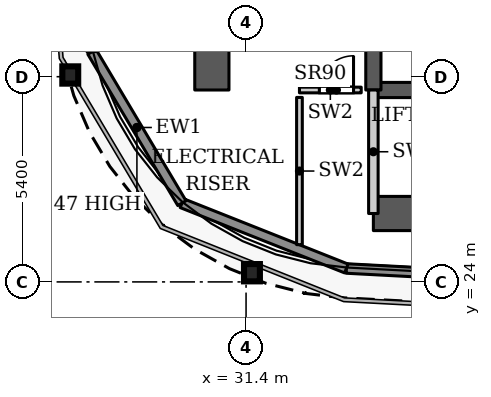
"""IFC4 building model, lengths in metres.
Left out: names, types, materials, properties, quantities, classifications, styles, units other than length and angle.
Written with IfcOpenShell. Run it as: python <this file> out.ifc"""

import sys

from ifc_helpers import new_model, si_unit, direction, frame, frame_2d, origin, origin_2d, place, context, subcontext, project, spatial, rectangle, i_section, extrude, source, transform, mapped, element, fill, save


model = new_model("IFC4")
c1 = context("Model", 3, precision=1e-05, world=origin(), true_north=direction((0.0, 1.0)))
c2 = subcontext(c1, "Body", "Model", "MODEL_VIEW")
j1 = project(units=[si_unit("LENGTHUNIT", "METRE"), si_unit("PLANEANGLEUNIT", "RADIAN")], contexts=[c1])
p1 = place(None, origin())
s1 = spatial("IfcSite", under=j1, at=p1, CompositionType="ELEMENT")
p2 = place(p1, origin())
s2 = spatial("IfcBuilding", under=s1, at=p2, CompositionType="ELEMENT")
p3 = place(p2, frame((0.0, 0.0, 98.0)))
s3 = spatial("IfcBuildingStorey", under=s2, at=p3, CompositionType="ELEMENT", Elevation=98.0)
for number, where, z_axis, x_axis in (
    (1, (31.555, 24.242, 0.0), (0.0, 0.0, 1.0), (1.0, 0.0, 0.0)),
    (2, (26.774, 29.445, 0.0), (0.0, 0.0, 1.0), (1.0, 0.0, 0.0)),
):
    element("IfcColumn", number, at=place(p3, frame(where, z_axis=z_axis, x_axis=x_axis)), inside=s3, PredefinedType="COLUMN", context=c2, shape_type="SweptSolid", body=[
        extrude(i_section(OverallWidth=0.418, OverallDepth=0.455, WebThickness=0.042, FlangeThickness=0.068, FilletRadius=0.014, at=origin_2d()), origin(), (0.0, 0.0, 1.0), 3.9),
    ])
p4 = place(p3, frame((34.75, 25.8, 0.0), z_axis=(0.0, 0.0, 1.0), x_axis=(1.0, 0.0, 0.0)))
e3 = element("IfcWall", 3, at=p4, inside=s3, PredefinedType="SHEAR", context=c2, shape_type="SweptSolid", body=[
    extrude(rectangle(XDim=18.4, YDim=0.9, at=frame_2d((9.2, 0.0))), origin(), (0.0, 0.0, 1.0), 3.9),
])
p5 = place(p3, frame((34.75, 29.05, 0.0), z_axis=(0.0, 0.0, 1.0), x_axis=(1.0, 0.0, 0.0)))
e4 = element("IfcWall", 4, at=p5, inside=s3, PredefinedType="SHEAR", context=c2, shape_type="SweptSolid", body=[
    extrude(rectangle(XDim=18.4, YDim=0.4, at=frame_2d((9.2, 0.0))), origin(), (0.0, 0.0, 1.0), 3.9),
])
p6 = place(p5, frame((15.125, 0.0, 0.0)))
e5 = element("IfcOpeningElement", 5, at=p6, cuts=e4, PredefinedType="OPENING", context=c2, shape_type="SweptSolid", body=[
    extrude(rectangle(XDim=1.1, YDim=2.2, at=frame_2d((0.55, 1.1))), frame((0.0, 0.21, 0.0), z_axis=(0.0, -1.0, 0.0), x_axis=(1.0, 0.0, 0.0)), (0.0, 0.0, 1.0), 0.42),
])
p7 = place(p3, frame((34.75, 29.05, 0.0), z_axis=(0.0, 0.0, 1.0), x_axis=(0.0, 1.0, 0.0)))
e6 = element("IfcWall", 6, at=p7, inside=s3, PredefinedType="SHEAR", context=c2, shape_type="SweptSolid", body=[
    extrude(rectangle(XDim=18.45, YDim=0.4, at=frame_2d((9.225, 0.0))), origin(), (0.0, 0.0, 1.0), 3.9),
])
p8 = place(p7, frame((8.025, 0.0, 0.0)))
e7 = element("IfcOpeningElement", 7, at=p8, cuts=e6, PredefinedType="OPENING", context=c2, shape_type="SweptSolid", body=[
    extrude(rectangle(XDim=1.1, YDim=2.2, at=frame_2d((0.55, 1.1))), frame((0.0, 0.21, 0.0), z_axis=(0.0, -1.0, 0.0), x_axis=(1.0, 0.0, 0.0)), (0.0, 0.0, 1.0), 0.42),
])
p9 = place(p7, frame((10.875, 0.0, 0.0)))
e8 = element("IfcOpeningElement", 8, at=p9, cuts=e6, PredefinedType="OPENING", context=c2, shape_type="SweptSolid", body=[
    extrude(rectangle(XDim=1.1, YDim=2.2, at=frame_2d((0.55, 1.1))), frame((0.0, 0.21, 0.0), z_axis=(0.0, -1.0, 0.0), x_axis=(1.0, 0.0, 0.0)), (0.0, 0.0, 1.0), 0.42),
])
p10 = place(p7, frame((13.725, 0.0, 0.0)))
e9 = element("IfcOpeningElement", 9, at=p10, cuts=e6, PredefinedType="OPENING", context=c2, shape_type="SweptSolid", body=[
    extrude(rectangle(XDim=1.1, YDim=2.2, at=frame_2d((0.55, 1.1))), frame((0.0, 0.21, 0.0), z_axis=(0.0, -1.0, 0.0), x_axis=(1.0, 0.0, 0.0)), (0.0, 0.0, 1.0), 0.42),
])
p11 = place(p7, frame((15.95, 0.0, 0.0)))
e10 = element("IfcOpeningElement", 10, at=p11, cuts=e6, PredefinedType="OPENING", context=c2, shape_type="SweptSolid", body=[
    extrude(rectangle(XDim=1.1, YDim=2.2, at=frame_2d((0.55, 1.1))), frame((0.0, 0.21, 0.0), z_axis=(0.0, -1.0, 0.0), x_axis=(1.0, 0.0, 0.0)), (0.0, 0.0, 1.0), 0.42),
])
p12 = place(p3, frame((30.5, 29.05, 0.0), z_axis=(0.0, 0.0, 1.0), x_axis=(0.0, 1.0, 0.0)))
e11 = element("IfcWall", 11, at=p12, inside=s3, PredefinedType="SHEAR", context=c2, shape_type="SweptSolid", body=[
    extrude(rectangle(XDim=18.45, YDim=0.9, at=frame_2d((9.225, 0.0))), origin(), (0.0, 0.0, 1.0), 3.9),
])
p13 = place(p12, frame((1.5, 0.0, 0.0)))
e12 = element("IfcOpeningElement", 12, at=p13, cuts=e11, PredefinedType="OPENING", context=c2, shape_type="SweptSolid", body=[
    extrude(rectangle(XDim=0.9, YDim=2.2, at=frame_2d((0.45, 1.1))), frame((0.0, 0.46, 0.0), z_axis=(0.0, -1.0, 0.0), x_axis=(1.0, 0.0, 0.0)), (0.0, 0.0, 1.0), 0.92),
])
p14 = place(p12, frame((6.03, 0.0, 0.0)))
e13 = element("IfcOpeningElement", 13, at=p14, cuts=e11, PredefinedType="OPENING", context=c2, shape_type="SweptSolid", body=[
    extrude(rectangle(XDim=0.9, YDim=2.2, at=frame_2d((0.45, 1.1))), frame((0.0, 0.46, 0.0), z_axis=(0.0, -1.0, 0.0), x_axis=(1.0, 0.0, 0.0)), (0.0, 0.0, 1.0), 0.92),
])
p15 = place(p12, frame((9.7, 0.0, 0.0)))
e14 = element("IfcOpeningElement", 14, at=p15, cuts=e11, PredefinedType="OPENING", context=c2, shape_type="SweptSolid", body=[
    extrude(rectangle(XDim=0.9, YDim=2.2, at=frame_2d((0.45, 1.1))), frame((0.0, 0.46, 0.0), z_axis=(0.0, -1.0, 0.0), x_axis=(1.0, 0.0, 0.0)), (0.0, 0.0, 1.0), 0.92),
])
p16 = place(p3, frame((100.586, 20.85, 0.0), z_axis=(0.0, 0.0, 1.0), x_axis=(-0.99861746497, 0.052565755559, 0.0)))
e15 = element("IfcWall", 15, at=p16, inside=s3, PredefinedType="SOLIDWALL", context=c2, shape_type="SweptSolid", body=[
    extrude(rectangle(XDim=66.639, YDim=0.25, at=frame_2d((33.319, 0.0))), origin(), (0.0, 0.0, 1.0), 3.75),
])
p17 = place(p3, frame((34.039, 24.353, 0.0), z_axis=(0.0, 0.0, 1.0), x_axis=(-0.929352825399, 0.369192803184, 0.0)))
e16 = element("IfcWall", 16, at=p17, inside=s3, PredefinedType="SOLIDWALL", context=c2, shape_type="SweptSolid", body=[
    extrude(rectangle(XDim=4.656, YDim=0.25, at=frame_2d((2.328, 0.0))), origin(), (0.0, 0.0, 1.0), 3.75),
])
p18 = place(p3, frame((29.712, 26.072, 0.0), z_axis=(0.0, 0.0, 1.0), x_axis=(-0.511028049012, 0.859564036662, 0.0)))
e17 = element("IfcWall", 17, at=p18, inside=s3, PredefinedType="SOLIDWALL", context=c2, shape_type="SweptSolid", body=[
    extrude(rectangle(XDim=4.634, YDim=0.25, at=frame_2d((2.317, 0.0))), origin(), (0.0, 0.0, 1.0), 3.147),
])
p19 = place(p3, frame((27.344, 30.055, 0.0), z_axis=(0.0, 0.0, 1.0), x_axis=(-0.077571675317, 0.99698677784, 0.0)))
e18 = element("IfcWall", 18, at=p19, inside=s3, PredefinedType="SOLIDWALL", context=c2, shape_type="SweptSolid", body=[
    extrude(rectangle(XDim=1.92, YDim=0.25, at=frame_2d((0.96, 0.0))), origin(), (0.0, 0.0, 1.0), 3.75),
])
p20 = place(p3, frame((34.75, 25.8, 0.0), z_axis=(0.0, 0.0, 1.0), x_axis=(0.0, 1.0, 0.0)))
e19 = element("IfcWall", 19, at=p20, inside=s3, PredefinedType="PARTITIONING", context=c2, shape_type="SweptSolid", body=[
    extrude(rectangle(XDim=3.25, YDim=0.25, at=frame_2d((1.625, 0.0))), origin(), (0.0, 0.0, 1.0), 3.9),
])
p21 = place(p3, frame((32.805, 29.05, 0.0), z_axis=(0.0, 0.0, 1.0), x_axis=(1.0, 0.0, 0.0)))
e20 = element("IfcWall", 20, at=p21, inside=s3, PredefinedType="PARTITIONING", context=c2, shape_type="SweptSolid", body=[
    extrude(rectangle(XDim=1.625, YDim=0.15, at=frame_2d((0.812, 0.0))), origin(), (0.0, 0.0, 1.0), 3.9),
])
p22 = place(p21, frame((0.523, 0.0, 0.0)))
e21 = element("IfcOpeningElement", 21, at=p22, cuts=e20, PredefinedType="OPENING", context=c2, shape_type="SweptSolid", body=[
    extrude(rectangle(XDim=0.9, YDim=2.2, at=frame_2d((0.45, 1.1))), frame((0.0, 0.085, 0.0), z_axis=(0.0, -1.0, 0.0), x_axis=(1.0, 0.0, 0.0)), (0.0, 0.0, 1.0), 0.17),
])
p23 = place(p3, frame((32.805, 24.98, 0.0), z_axis=(0.0, 0.0, 1.0), x_axis=(0.0, 1.0, 0.0)))
e22 = element("IfcWall", 22, at=p23, inside=s3, PredefinedType="PARTITIONING", context=c2, shape_type="SweptSolid", body=[
    extrude(rectangle(XDim=3.875, YDim=0.15, at=frame_2d((1.938, 0.0))), origin(), (0.0, 0.0, 1.0), 3.9),
])
m1 = source(origin(), c2, "Body", "SweptSolid", [
    extrude(rectangle(XDim=0.9, YDim=2.2, at=frame_2d((0.45, 1.1))), frame((0.0, 0.025, 0.0), z_axis=(0.0, -1.0, 0.0), x_axis=(1.0, 0.0, 0.0)), (0.0, 0.0, 1.0), 0.05),
])
p24 = place(p22, origin())
e23 = element("IfcDoor", 23, at=p24, inside=s3, OperationType="SINGLE_SWING_LEFT", PredefinedType="DOOR", context=c2, shape_type="MappedRepresentation", body=[
    mapped(m1, transform((0.0, 0.0, 0.0), x_axis=(1.0, 0.0, 0.0), y_axis=(0.0, 1.0, 0.0), z_axis=(0.0, 0.0, 1.0), scale=1.0)),
])
fill(e21, e23)
save(model, sys.argv[1])
